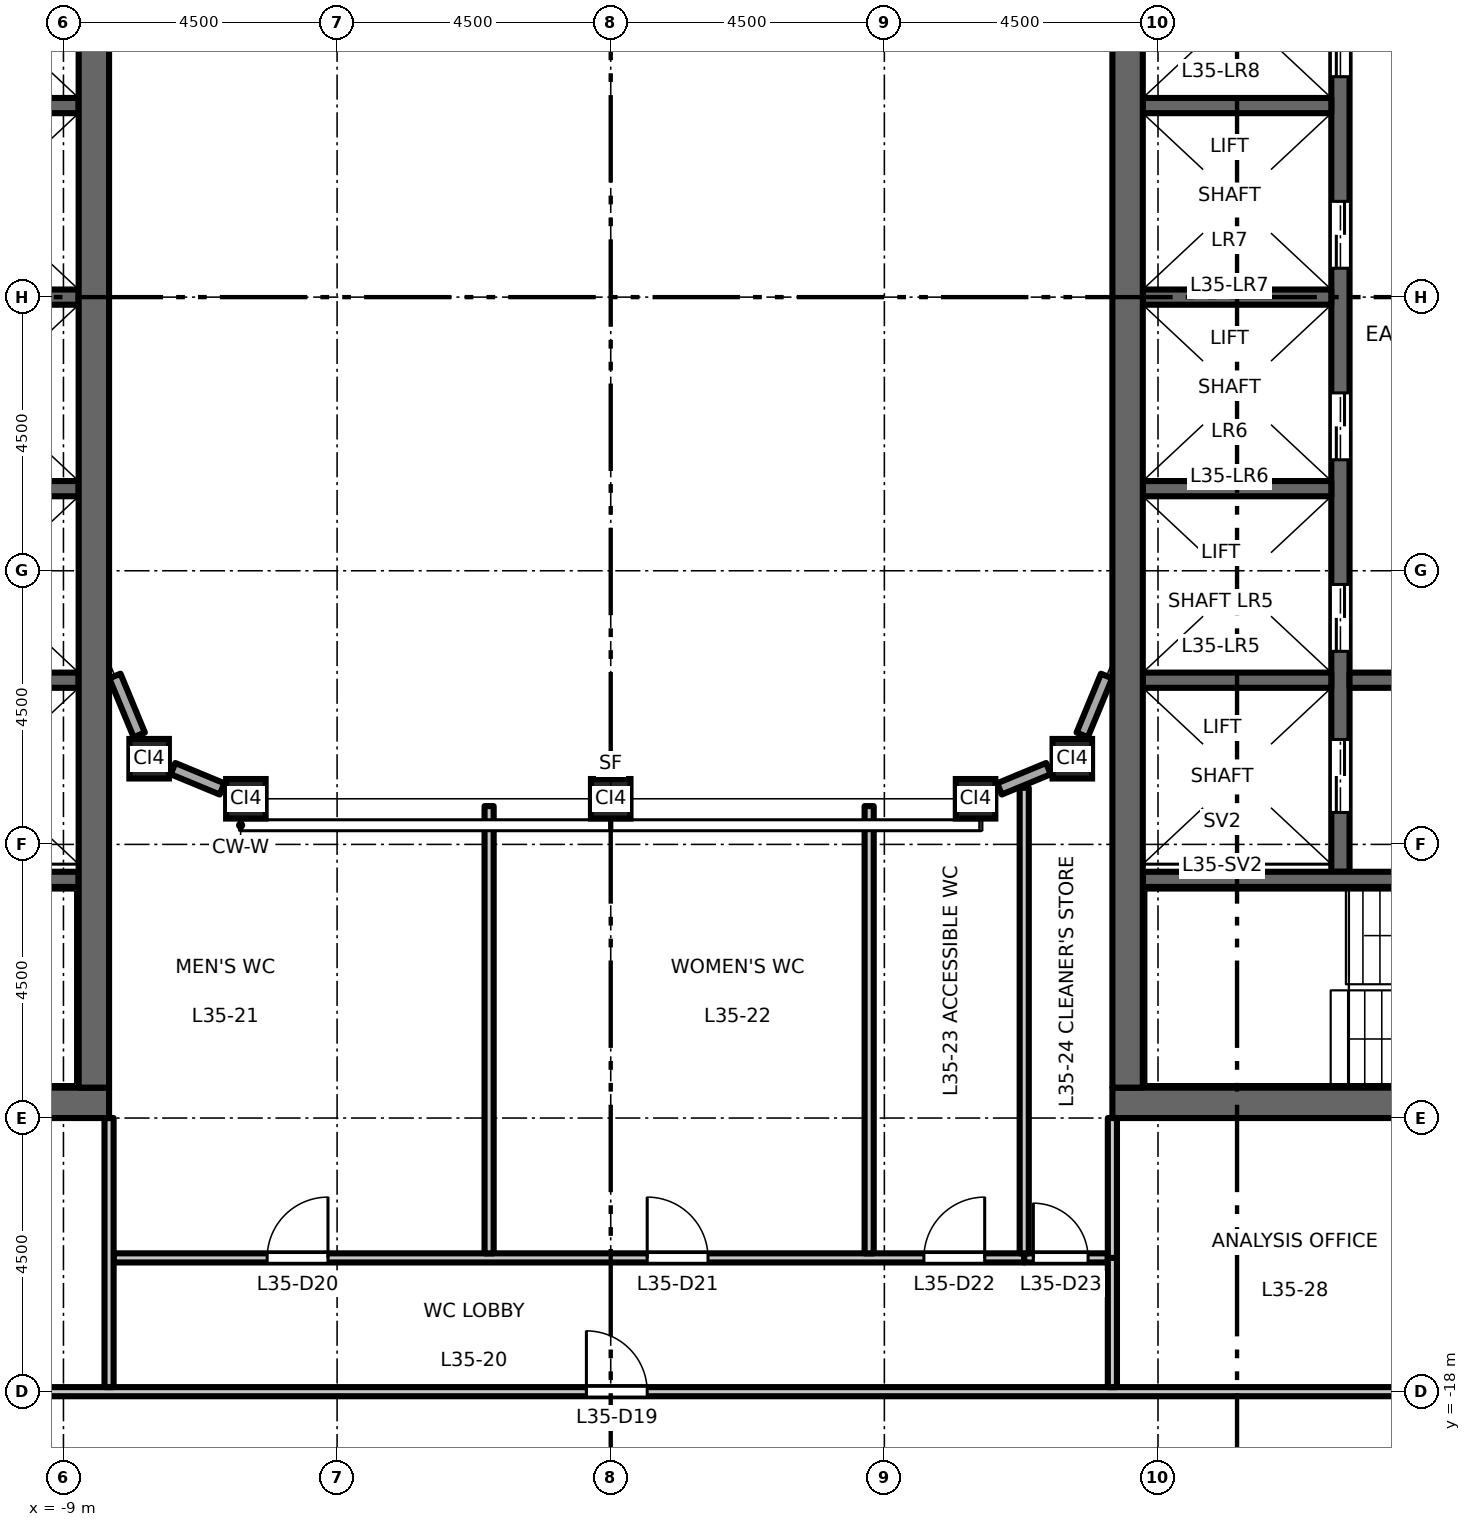
"""IFC4 building model, lengths in metres.
Left out: names, types, materials, properties, quantities, classifications, styles, units other than length and angle.
Written with IfcOpenShell. Run it as: python <this file> out.ifc"""

import sys

from ifc_helpers import new_model, si_unit, direction, frame, frame_2d, origin, origin_2d, place, context, subcontext, project, spatial, rectangle, hollow_rectangle, extrude, element, fill, save


model = new_model("IFC4")
c1 = context("Model", 3, precision=1e-05, world=origin(), true_north=direction((0.0, 1.0)))
c2 = subcontext(c1, "Body", "Model", "MODEL_VIEW")
j1 = project(units=[si_unit("LENGTHUNIT", "METRE"), si_unit("PLANEANGLEUNIT", "RADIAN")], contexts=[c1])
p1 = place(None, origin())
s1 = spatial("IfcSite", under=j1, at=p1, CompositionType="ELEMENT")
p2 = place(p1, origin())
s2 = spatial("IfcBuilding", under=s1, at=p2, CompositionType="ELEMENT")
p3 = place(p2, frame((0.0, 0.0, 163.2)))
s3 = spatial("IfcBuildingStorey", under=s2, at=p3, CompositionType="ELEMENT", Elevation=163.2)
for number, where, z_axis, x_axis in (
    (1, (-7.591, -7.591, 0.0), (0.0, 0.0, 1.0), (1.0, 0.0, 0.0)),
    (2, (-6.0, -8.25, 0.0), (0.0, 0.0, 1.0), (1.0, 0.0, 0.0)),
    (3, (0.0, -8.25, 0.0), (0.0, 0.0, 1.0), (1.0, 0.0, 0.0)),
    (4, (6.0, -8.25, 0.0), (0.0, 0.0, 1.0), (1.0, 0.0, 0.0)),
    (5, (7.591, -7.591, 0.0), (0.0, 0.0, 1.0), (1.0, 0.0, 0.0)),
):
    element("IfcColumn", number, at=place(p3, frame(where, z_axis=z_axis, x_axis=x_axis)), inside=s3, PredefinedType="COLUMN", context=c2, shape_type="SweptSolid", body=[
        extrude(hollow_rectangle(XDim=0.65, YDim=0.65, WallThickness=0.036, at=origin_2d()), origin(), (0.0, 0.0, 1.0), 4.5),
    ])
for number, where, z_axis, x_axis in (
    (6, (-8.75, 0.0, 0.0), (0.0, 0.0, 1.0), (-1.0, 0.0, 0.0)),
    (7, (-8.75, 3.15, 0.0), (0.0, 0.0, 1.0), (-1.0, 0.0, 0.0)),
    (8, (-8.75, -3.15, 0.0), (0.0, 0.0, 1.0), (-1.0, 0.0, 0.0)),
    (9, (-8.75, -6.3, 0.0), (0.0, 0.0, 1.0), (-1.0, 0.0, 0.0)),
):
    element("IfcWall", number, at=place(p3, frame(where, z_axis=z_axis, x_axis=x_axis)), inside=s3, PredefinedType="SHEAR", context=c2, shape_type="SweptSolid", body=[
        extrude(rectangle(XDim=3.1, YDim=0.25, at=frame_2d((1.55, 0.0))), origin(), (0.0, 0.0, 1.0), 4.35),
    ])
p4 = place(p3, frame((-8.75, -9.575, 0.0), z_axis=(0.0, 0.0, 1.0), x_axis=(-1.0, 0.0, 0.0)))
e10 = element("IfcWall", 10, at=p4, inside=s3, PredefinedType="SHEAR", context=c2, shape_type="SweptSolid", body=[
    extrude(rectangle(XDim=8.0, YDim=0.25, at=frame_2d((4.0, 0.0))), origin(), (0.0, 0.0, 1.0), 4.35),
])
p5 = place(p4, frame((6.65, 0.0, 0.0)))
e11 = element("IfcOpeningElement", 11, at=p5, cuts=e10, PredefinedType="OPENING", context=c2, shape_type="SweptSolid", body=[
    extrude(rectangle(XDim=1.1, YDim=2.1, at=frame_2d((0.55, 1.05))), frame((0.0, 0.135, 0.0), z_axis=(0.0, -1.0, 0.0), x_axis=(1.0, 0.0, 0.0)), (0.0, 0.0, 1.0), 0.27),
])
p6 = place(p3, frame((-8.25, -13.25, 0.0), z_axis=(0.0, 0.0, 1.0), x_axis=(-1.0, 0.0, 0.0)))
e12 = element("IfcWall", 12, at=p6, inside=s3, PredefinedType="SHEAR", context=c2, shape_type="SweptSolid", body=[
    extrude(rectangle(XDim=13.5, YDim=0.5, at=frame_2d((6.75, 0.0))), origin(), (0.0, 0.0, 1.0), 4.35),
])
p7 = place(p3, frame((-8.5, -13.0, 0.0), z_axis=(0.0, 0.0, 1.0), x_axis=(0.0, 1.0, 0.0)))
e13 = element("IfcWall", 13, at=p7, inside=s3, PredefinedType="SHEAR", context=c2, shape_type="SweptSolid", body=[
    extrude(rectangle(XDim=26.0, YDim=0.5, at=frame_2d((13.0, 0.0))), origin(), (0.0, 0.0, 1.0), 4.35),
])
p8 = place(p3, frame((12.0, -9.45, 0.0), z_axis=(0.0, 0.0, 1.0), x_axis=(0.0, 1.0, 0.0)))
e14 = element("IfcWall", 14, at=p8, inside=s3, PredefinedType="SHEAR", context=c2, shape_type="SweptSolid", body=[
    extrude(rectangle(XDim=18.9, YDim=0.3, at=frame_2d((9.45, 0.0))), origin(), (0.0, 0.0, 1.0), 4.35),
])
p9 = place(p8, frame((3.625, 0.0, 0.0)))
e15 = element("IfcOpeningElement", 15, at=p9, cuts=e14, PredefinedType="OPENING", context=c2, shape_type="SweptSolid", body=[
    extrude(rectangle(XDim=1.1, YDim=2.1, at=frame_2d((0.55, 1.05))), frame((0.0, 0.16, 0.0), z_axis=(0.0, -1.0, 0.0), x_axis=(1.0, 0.0, 0.0)), (0.0, 0.0, 1.0), 0.32),
])
p10 = place(p8, frame((6.775, 0.0, 0.0)))
e16 = element("IfcOpeningElement", 16, at=p10, cuts=e14, PredefinedType="OPENING", context=c2, shape_type="SweptSolid", body=[
    extrude(rectangle(XDim=1.1, YDim=2.1, at=frame_2d((0.55, 1.05))), frame((0.0, 0.16, 0.0), z_axis=(0.0, -1.0, 0.0), x_axis=(1.0, 0.0, 0.0)), (0.0, 0.0, 1.0), 0.32),
])
p11 = place(p8, frame((9.925, 0.0, 0.0)))
e17 = element("IfcOpeningElement", 17, at=p11, cuts=e14, PredefinedType="OPENING", context=c2, shape_type="SweptSolid", body=[
    extrude(rectangle(XDim=1.1, YDim=2.1, at=frame_2d((0.55, 1.05))), frame((0.0, 0.16, 0.0), z_axis=(0.0, -1.0, 0.0), x_axis=(1.0, 0.0, 0.0)), (0.0, 0.0, 1.0), 0.32),
])
p12 = place(p8, frame((13.075, 0.0, 0.0)))
e18 = element("IfcOpeningElement", 18, at=p12, cuts=e14, PredefinedType="OPENING", context=c2, shape_type="SweptSolid", body=[
    extrude(rectangle(XDim=1.1, YDim=2.1, at=frame_2d((0.55, 1.05))), frame((0.0, 0.16, 0.0), z_axis=(0.0, -1.0, 0.0), x_axis=(1.0, 0.0, 0.0)), (0.0, 0.0, 1.0), 0.32),
])
p13 = place(p8, frame((16.725, 0.0, 0.0)))
e19 = element("IfcOpeningElement", 19, at=p13, cuts=e14, PredefinedType="OPENING", context=c2, shape_type="SweptSolid", body=[
    extrude(rectangle(XDim=1.2, YDim=2.1, at=frame_2d((0.6, 1.05))), frame((0.0, 0.16, 0.0), z_axis=(0.0, -1.0, 0.0), x_axis=(1.0, 0.0, 0.0)), (0.0, 0.0, 1.0), 0.32),
])
p14 = place(p8, frame((0.975, 0.0, 0.0)))
e20 = element("IfcOpeningElement", 20, at=p14, cuts=e14, PredefinedType="OPENING", context=c2, shape_type="SweptSolid", body=[
    extrude(rectangle(XDim=1.2, YDim=2.1, at=frame_2d((0.6, 1.05))), frame((0.0, 0.16, 0.0), z_axis=(0.0, -1.0, 0.0), x_axis=(1.0, 0.0, 0.0)), (0.0, 0.0, 1.0), 0.32),
])
p15 = place(p3, frame((12.15, -6.3, 0.0), z_axis=(0.0, 0.0, 1.0), x_axis=(1.0, 0.0, 0.0)))
e21 = element("IfcWall", 21, at=p15, inside=s3, PredefinedType="SHEAR", context=c2, shape_type="SweptSolid", body=[
    extrude(rectangle(XDim=9.1, YDim=0.25, at=frame_2d((4.55, 0.0))), origin(), (0.0, 0.0, 1.0), 4.35),
])
p16 = place(p15, frame((1.8, 0.0, 0.0)))
e22 = element("IfcOpeningElement", 22, at=p16, cuts=e21, PredefinedType="OPENING", context=c2, shape_type="SweptSolid", body=[
    extrude(rectangle(XDim=1.0, YDim=2.1, at=frame_2d((0.5, 1.05))), frame((0.0, 0.135, 0.0), z_axis=(0.0, -1.0, 0.0), x_axis=(1.0, 0.0, 0.0)), (0.0, 0.0, 1.0), 0.27),
])
p17 = place(p15, frame((6.15, 0.0, 0.0)))
e23 = element("IfcOpeningElement", 23, at=p17, cuts=e21, PredefinedType="OPENING", context=c2, shape_type="SweptSolid", body=[
    extrude(rectangle(XDim=0.9, YDim=2.1, at=frame_2d((0.45, 1.05))), frame((0.0, 0.135, 0.0), z_axis=(0.0, -1.0, 0.0), x_axis=(1.0, 0.0, 0.0)), (0.0, 0.0, 1.0), 0.27),
])
for number, where, z_axis, x_axis in (
    (24, (8.75, 0.0, 0.0), (0.0, 0.0, 1.0), (1.0, 0.0, 0.0)),
    (25, (8.75, 3.15, 0.0), (0.0, 0.0, 1.0), (1.0, 0.0, 0.0)),
    (26, (8.75, -3.15, 0.0), (0.0, 0.0, 1.0), (1.0, 0.0, 0.0)),
    (27, (8.75, -6.3, 0.0), (0.0, 0.0, 1.0), (1.0, 0.0, 0.0)),
):
    element("IfcWall", number, at=place(p3, frame(where, z_axis=z_axis, x_axis=x_axis)), inside=s3, PredefinedType="SHEAR", context=c2, shape_type="SweptSolid", body=[
        extrude(rectangle(XDim=3.1, YDim=0.25, at=frame_2d((1.55, 0.0))), origin(), (0.0, 0.0, 1.0), 4.35),
    ])
p18 = place(p3, frame((8.75, -9.575, 0.0), z_axis=(0.0, 0.0, 1.0), x_axis=(1.0, 0.0, 0.0)))
e28 = element("IfcWall", 28, at=p18, inside=s3, PredefinedType="SHEAR", context=c2, shape_type="SweptSolid", body=[
    extrude(rectangle(XDim=8.0, YDim=0.25, at=frame_2d((4.0, 0.0))), origin(), (0.0, 0.0, 1.0), 4.35),
])
p19 = place(p18, frame((6.65, 0.0, 0.0)))
e29 = element("IfcOpeningElement", 29, at=p19, cuts=e28, PredefinedType="OPENING", context=c2, shape_type="SweptSolid", body=[
    extrude(rectangle(XDim=1.1, YDim=2.1, at=frame_2d((0.55, 1.05))), frame((0.0, 0.135, 0.0), z_axis=(0.0, -1.0, 0.0), x_axis=(1.0, 0.0, 0.0)), (0.0, 0.0, 1.0), 0.27),
])
p20 = place(p3, frame((8.25, -13.25, 0.0), z_axis=(0.0, 0.0, 1.0), x_axis=(1.0, 0.0, 0.0)))
e30 = element("IfcWall", 30, at=p20, inside=s3, PredefinedType="SHEAR", context=c2, shape_type="SweptSolid", body=[
    extrude(rectangle(XDim=13.5, YDim=0.5, at=frame_2d((6.75, 0.0))), origin(), (0.0, 0.0, 1.0), 4.35),
])
p21 = place(p3, frame((8.5, -13.0, 0.0), z_axis=(0.0, 0.0, 1.0), x_axis=(0.0, 1.0, 0.0)))
e31 = element("IfcWall", 31, at=p21, inside=s3, PredefinedType="SHEAR", context=c2, shape_type="SweptSolid", body=[
    extrude(rectangle(XDim=26.0, YDim=0.5, at=frame_2d((13.0, 0.0))), origin(), (0.0, 0.0, 1.0), 4.35),
])
p22 = place(p3, frame((6.392, -8.087, 0.0), z_axis=(0.0, 0.0, 1.0), x_axis=(0.923894108428, 0.382648241093, 0.0)))
e32 = element("IfcWall", 32, at=p22, inside=s3, PredefinedType="STANDARD", context=c2, shape_type="SweptSolid", body=[
    extrude(rectangle(XDim=0.873, YDim=0.2, at=frame_2d((0.437, 0.0))), origin(), (0.0, 0.0, 1.0), 3.826),
])
for number, where, z_axis, x_axis in (
    (33, (7.753, -7.199, 0.0), (0.0, 0.0, 1.0), (0.383, 0.924, 0.0)),
    (34, (-8.154, -6.231, 0.0), (0.0, 0.0, 1.0), (0.383, -0.924, 0.0)),
):
    element("IfcWall", number, at=place(p3, frame(where, z_axis=z_axis, x_axis=x_axis)), inside=s3, PredefinedType="STANDARD", context=c2, shape_type="SweptSolid", body=[
        extrude(rectangle(XDim=1.048, YDim=0.2, at=frame_2d((0.524, 0.0))), origin(), (0.0, 0.0, 1.0), 3.826),
    ])
p23 = place(p3, frame((-7.199, -7.753, 0.0), z_axis=(0.0, 0.0, 1.0), x_axis=(0.923894108428, -0.382648241093, 0.0)))
e35 = element("IfcWall", 35, at=p23, inside=s3, PredefinedType="STANDARD", context=c2, shape_type="SweptSolid", body=[
    extrude(rectangle(XDim=0.873, YDim=0.2, at=frame_2d((0.437, 0.0))), origin(), (0.0, 0.0, 1.0), 3.826),
])
p24 = place(p3, frame((-21.825, -18.0, 0.0), z_axis=(0.0, 0.0, 1.0), x_axis=(1.0, 0.0, 0.0)))
e36 = element("IfcWall", 36, at=p24, inside=s3, PredefinedType="PARTITIONING", context=c2, shape_type="SweptSolid", body=[
    extrude(rectangle(XDim=43.65, YDim=0.15, at=frame_2d((21.825, 0.0))), origin(), (0.0, 0.0, 1.0), 4.35),
])
p25 = place(p24, frame((21.425, 0.0, 0.0)))
e37 = element("IfcOpeningElement", 37, at=p25, cuts=e36, PredefinedType="OPENING", context=c2, shape_type="SweptSolid", body=[
    extrude(rectangle(XDim=1.0, YDim=2.1, at=frame_2d((0.5, 1.05))), frame((0.0, 0.085, 0.0), z_axis=(0.0, -1.0, 0.0), x_axis=(1.0, 0.0, 0.0)), (0.0, 0.0, 1.0), 0.17),
])
p26 = place(p24, frame((6.425, 0.0, 0.0)))
e38 = element("IfcOpeningElement", 38, at=p26, cuts=e36, PredefinedType="OPENING", context=c2, shape_type="SweptSolid", body=[
    extrude(rectangle(XDim=1.0, YDim=2.1, at=frame_2d((0.5, 1.05))), frame((0.0, 0.085, 0.0), z_axis=(0.0, -1.0, 0.0), x_axis=(1.0, 0.0, 0.0)), (0.0, 0.0, 1.0), 0.17),
])
p27 = place(p24, frame((36.425, 0.0, 0.0)))
e39 = element("IfcOpeningElement", 39, at=p27, cuts=e36, PredefinedType="OPENING", context=c2, shape_type="SweptSolid", body=[
    extrude(rectangle(XDim=1.0, YDim=2.1, at=frame_2d((0.5, 1.05))), frame((0.0, 0.085, 0.0), z_axis=(0.0, -1.0, 0.0), x_axis=(1.0, 0.0, 0.0)), (0.0, 0.0, 1.0), 0.17),
])
p28 = place(p3, frame((-8.175, -15.8, 0.0), z_axis=(0.0, 0.0, 1.0), x_axis=(1.0, 0.0, 0.0)))
e40 = element("IfcWall", 40, at=p28, inside=s3, PredefinedType="PARTITIONING", context=c2, shape_type="SweptSolid", body=[
    extrude(rectangle(XDim=14.975, YDim=0.15, at=frame_2d((7.488, 0.0))), origin(), (0.0, 0.0, 1.0), 4.35),
])
p29 = place(p28, frame((2.525, 0.0, 0.0)))
e41 = element("IfcOpeningElement", 41, at=p29, cuts=e40, PredefinedType="OPENING", context=c2, shape_type="SweptSolid", body=[
    extrude(rectangle(XDim=1.0, YDim=2.1, at=frame_2d((0.5, 1.05))), frame((0.0, 0.085, 0.0), z_axis=(0.0, -1.0, 0.0), x_axis=(1.0, 0.0, 0.0)), (0.0, 0.0, 1.0), 0.17),
])
p30 = place(p28, frame((8.775, 0.0, 0.0)))
e42 = element("IfcOpeningElement", 42, at=p30, cuts=e40, PredefinedType="OPENING", context=c2, shape_type="SweptSolid", body=[
    extrude(rectangle(XDim=1.0, YDim=2.1, at=frame_2d((0.5, 1.05))), frame((0.0, 0.085, 0.0), z_axis=(0.0, -1.0, 0.0), x_axis=(1.0, 0.0, 0.0)), (0.0, 0.0, 1.0), 0.17),
])
p31 = place(p28, frame((13.325, 0.0, 0.0)))
e43 = element("IfcOpeningElement", 43, at=p31, cuts=e40, PredefinedType="OPENING", context=c2, shape_type="SweptSolid", body=[
    extrude(rectangle(XDim=1.0, YDim=2.1, at=frame_2d((0.5, 1.05))), frame((0.0, 0.085, 0.0), z_axis=(0.0, -1.0, 0.0), x_axis=(1.0, 0.0, 0.0)), (0.0, 0.0, 1.0), 0.17),
])
p32 = place(p3, frame((6.8, -15.8, 0.0), z_axis=(0.0, 0.0, 1.0), x_axis=(1.0, 0.0, 0.0)))
e44 = element("IfcWall", 44, at=p32, inside=s3, PredefinedType="PARTITIONING", context=c2, shape_type="SweptSolid", body=[
    extrude(rectangle(XDim=1.375, YDim=0.15, at=frame_2d((0.688, 0.0))), origin(), (0.0, 0.0, 1.0), 4.35),
])
p33 = place(p32, frame((0.15, 0.0, 0.0)))
e45 = element("IfcOpeningElement", 45, at=p33, cuts=e44, PredefinedType="OPENING", context=c2, shape_type="SweptSolid", body=[
    extrude(rectangle(XDim=0.9, YDim=2.1, at=frame_2d((0.45, 1.05))), frame((0.0, 0.085, 0.0), z_axis=(0.0, -1.0, 0.0), x_axis=(1.0, 0.0, 0.0)), (0.0, 0.0, 1.0), 0.17),
])
p34 = place(p3, frame((-8.25, -17.925, 0.0), z_axis=(0.0, 0.0, 1.0), x_axis=(0.0, 1.0, 0.0)))
e46 = element("IfcWall", 46, at=p34, inside=s3, PredefinedType="PARTITIONING", context=c2, shape_type="SweptSolid", body=[
    extrude(rectangle(XDim=4.425, YDim=0.15, at=frame_2d((2.212, 0.0))), origin(), (0.0, 0.0, 1.0), 4.35),
])
for number, where, z_axis, x_axis in (
    (47, (-2.0, -15.725, 0.0), (0.0, 0.0, 1.0), (0.0, 1.0, 0.0)),
    (48, (4.25, -15.725, 0.0), (0.0, 0.0, 1.0), (0.0, 1.0, 0.0)),
):
    element("IfcWall", number, at=place(p3, frame(where, z_axis=z_axis, x_axis=x_axis)), inside=s3, PredefinedType="PARTITIONING", context=c2, shape_type="SweptSolid", body=[
        extrude(rectangle(XDim=7.355, YDim=0.15, at=frame_2d((3.677, 0.0))), origin(), (0.0, 0.0, 1.0), 4.35),
    ])
p35 = place(p3, frame((6.8, -15.725, 0.0), z_axis=(0.0, 0.0, 1.0), x_axis=(0.0, 1.0, 0.0)))
e49 = element("IfcWall", 49, at=p35, inside=s3, PredefinedType="PARTITIONING", context=c2, shape_type="SweptSolid", body=[
    extrude(rectangle(XDim=7.656, YDim=0.15, at=frame_2d((3.828, 0.0))), origin(), (0.0, 0.0, 1.0), 4.35),
])
p36 = place(p3, frame((8.25, -17.925, 0.0), z_axis=(0.0, 0.0, 1.0), x_axis=(0.0, 1.0, 0.0)))
e50 = element("IfcWall", 50, at=p36, inside=s3, PredefinedType="PARTITIONING", context=c2, shape_type="SweptSolid", body=[
    extrude(rectangle(XDim=2.125, YDim=0.15, at=frame_2d((1.062, 0.0))), origin(), (0.0, 0.0, 1.0), 4.35),
])
p37 = place(p3, frame((8.25, -15.8, 0.0), z_axis=(0.0, 0.0, 1.0), x_axis=(0.0, 1.0, 0.0)))
e51 = element("IfcWall", 51, at=p37, inside=s3, PredefinedType="PARTITIONING", context=c2, shape_type="SweptSolid", body=[
    extrude(rectangle(XDim=2.3, YDim=0.15, at=frame_2d((1.15, 0.0))), origin(), (0.0, 0.0, 1.0), 4.35),
])
p38 = place(p9, origin())
e52 = element("IfcDoor", 52, at=p38, inside=s3, OperationType="DOUBLE_DOOR_SLIDING", PredefinedType="DOOR", context=c2, shape_type="SweptSolid", body=[
    extrude(rectangle(XDim=1.1, YDim=2.1, at=frame_2d((0.55, 1.05))), frame((0.0, 0.025, 0.0), z_axis=(0.0, -1.0, 0.0), x_axis=(1.0, 0.0, 0.0)), (0.0, 0.0, 1.0), 0.05),
])
fill(e15, e52)
p39 = place(p10, origin())
e53 = element("IfcDoor", 53, at=p39, inside=s3, OperationType="DOUBLE_DOOR_SLIDING", PredefinedType="DOOR", context=c2, shape_type="SweptSolid", body=[
    extrude(rectangle(XDim=1.1, YDim=2.1, at=frame_2d((0.55, 1.05))), frame((0.0, 0.025, 0.0), z_axis=(0.0, -1.0, 0.0), x_axis=(1.0, 0.0, 0.0)), (0.0, 0.0, 1.0), 0.05),
])
fill(e16, e53)
p40 = place(p11, origin())
e54 = element("IfcDoor", 54, at=p40, inside=s3, OperationType="DOUBLE_DOOR_SLIDING", PredefinedType="DOOR", context=c2, shape_type="SweptSolid", body=[
    extrude(rectangle(XDim=1.1, YDim=2.1, at=frame_2d((0.55, 1.05))), frame((0.0, 0.025, 0.0), z_axis=(0.0, -1.0, 0.0), x_axis=(1.0, 0.0, 0.0)), (0.0, 0.0, 1.0), 0.05),
])
fill(e17, e54)
p41 = place(p12, origin())
e55 = element("IfcDoor", 55, at=p41, inside=s3, OperationType="DOUBLE_DOOR_SLIDING", PredefinedType="DOOR", context=c2, shape_type="SweptSolid", body=[
    extrude(rectangle(XDim=1.1, YDim=2.1, at=frame_2d((0.55, 1.05))), frame((0.0, 0.025, 0.0), z_axis=(0.0, -1.0, 0.0), x_axis=(1.0, 0.0, 0.0)), (0.0, 0.0, 1.0), 0.05),
])
fill(e18, e55)
p42 = place(p14, origin())
e56 = element("IfcDoor", 56, at=p42, inside=s3, OperationType="DOUBLE_DOOR_SLIDING", PredefinedType="DOOR", context=c2, shape_type="SweptSolid", body=[
    extrude(rectangle(XDim=1.2, YDim=2.1, at=frame_2d((0.6, 1.05))), frame((0.0, 0.025, 0.0), z_axis=(0.0, -1.0, 0.0), x_axis=(1.0, 0.0, 0.0)), (0.0, 0.0, 1.0), 0.05),
])
fill(e20, e56)
p43 = place(p25, origin())
e57 = element("IfcDoor", 57, at=p43, inside=s3, OperationType="SINGLE_SWING_LEFT", PredefinedType="DOOR", context=c2, shape_type="SweptSolid", body=[
    extrude(rectangle(XDim=1.0, YDim=2.1, at=frame_2d((0.5, 1.05))), frame((0.0, 0.025, 0.0), z_axis=(0.0, -1.0, 0.0), x_axis=(1.0, 0.0, 0.0)), (0.0, 0.0, 1.0), 0.05),
])
fill(e37, e57)
p44 = place(p29, origin())
e58 = element("IfcDoor", 58, at=p44, inside=s3, OperationType="SINGLE_SWING_RIGHT", PredefinedType="DOOR", context=c2, shape_type="SweptSolid", body=[
    extrude(rectangle(XDim=1.0, YDim=2.1, at=frame_2d((0.5, 1.05))), frame((0.0, 0.025, 0.0), z_axis=(0.0, -1.0, 0.0), x_axis=(1.0, 0.0, 0.0)), (0.0, 0.0, 1.0), 0.05),
])
fill(e41, e58)
p45 = place(p30, origin())
e59 = element("IfcDoor", 59, at=p45, inside=s3, OperationType="SINGLE_SWING_LEFT", PredefinedType="DOOR", context=c2, shape_type="SweptSolid", body=[
    extrude(rectangle(XDim=1.0, YDim=2.1, at=frame_2d((0.5, 1.05))), frame((0.0, 0.025, 0.0), z_axis=(0.0, -1.0, 0.0), x_axis=(1.0, 0.0, 0.0)), (0.0, 0.0, 1.0), 0.05),
])
fill(e42, e59)
p46 = place(p31, origin())
e60 = element("IfcDoor", 60, at=p46, inside=s3, OperationType="SINGLE_SWING_RIGHT", PredefinedType="DOOR", context=c2, shape_type="SweptSolid", body=[
    extrude(rectangle(XDim=1.0, YDim=2.1, at=frame_2d((0.5, 1.05))), frame((0.0, 0.025, 0.0), z_axis=(0.0, -1.0, 0.0), x_axis=(1.0, 0.0, 0.0)), (0.0, 0.0, 1.0), 0.05),
])
fill(e43, e60)
p47 = place(p33, origin())
e61 = element("IfcDoor", 61, at=p47, inside=s3, OperationType="SINGLE_SWING_LEFT", PredefinedType="DOOR", context=c2, shape_type="SweptSolid", body=[
    extrude(rectangle(XDim=0.9, YDim=2.1, at=frame_2d((0.45, 1.05))), frame((0.0, 0.025, 0.0), z_axis=(0.0, -1.0, 0.0), x_axis=(1.0, 0.0, 0.0)), (0.0, 0.0, 1.0), 0.05),
])
fill(e45, e61)
save(model, sys.argv[1])
